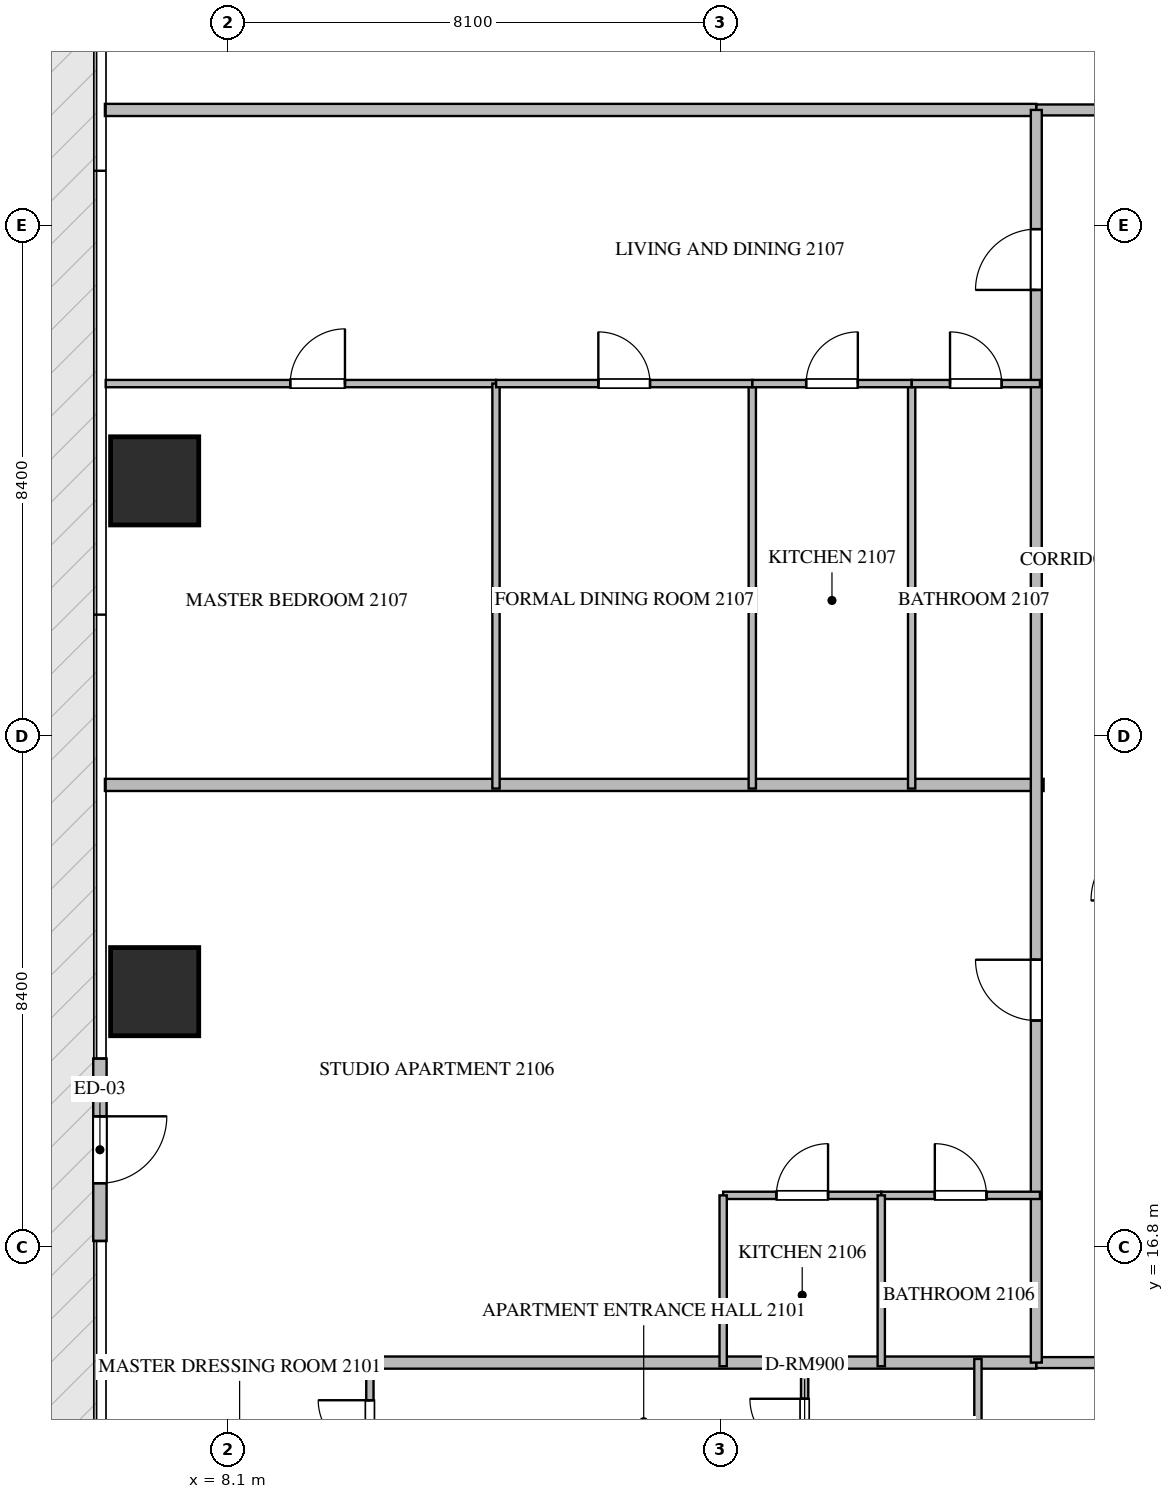
"""IFC4 building model, lengths in metres.
Left out: names, types, materials, properties, quantities, classifications, styles, units other than length and angle.
Written with IfcOpenShell. Run it as: python <this file> out.ifc"""

import sys

from ifc_helpers import new_model, si_unit, direction, frame, frame_2d, origin, origin_2d, place, context, subcontext, project, spatial, rectangle, extrude, source, transform, mapped, element, fill, save


model = new_model("IFC4")
c1 = context("Model", 3, precision=1e-05, world=origin(), true_north=direction((0.0, 1.0)))
c2 = subcontext(c1, "Body", "Model", "MODEL_VIEW")
j1 = project(units=[si_unit("LENGTHUNIT", "METRE"), si_unit("PLANEANGLEUNIT", "RADIAN")], contexts=[c1])
p1 = place(None, origin())
s1 = spatial("IfcSite", under=j1, at=p1, CompositionType="ELEMENT")
p2 = place(p1, origin())
s2 = spatial("IfcBuilding", under=s1, at=p2, CompositionType="ELEMENT")
p3 = place(p2, frame((0.0, 0.0, 86.7)))
s3 = spatial("IfcBuildingStorey", under=s2, at=p3, CompositionType="ELEMENT", Elevation=86.7)
m1 = source(origin(), c2, "Body", "SweptSolid", [
    extrude(rectangle(XDim=1.45, YDim=1.45, at=origin_2d()), origin(), (0.0, 0.0, 1.0), 3.75),
])
for number, where, z_axis, x_axis in (
    (1, (6.9, 21.0, -0.26), (0.0, 0.0, 1.0), (1.0, 0.0, 0.0)),
    (2, (6.9, 29.4, -0.26), (0.0, 0.0, 1.0), (1.0, 0.0, 0.0)),
):
    element("IfcColumn", number, at=place(p3, frame(where, z_axis=z_axis, x_axis=x_axis)), inside=s3, PredefinedType="COLUMN", context=c2, shape_type="MappedRepresentation", body=[
        mapped(m1, transform((0.0, 0.0, 0.0), scale=1.0)),
    ])
p4 = place(p3, frame((6.0, 19.9, 0.0), z_axis=(0.0, 0.0, 1.0), x_axis=(0.0, -1.0, 0.0)))
e3 = element("IfcWall", 3, at=p4, inside=s3, PredefinedType="ELEMENTEDWALL", context=c2, shape_type="SweptSolid", body=[
    extrude(rectangle(XDim=3.0, YDim=0.22, at=frame_2d((1.5, 0.0))), origin(), (0.0, 0.0, 1.0), 3.475),
])
p5 = place(p4, frame((0.95, 0.0, 0.0)))
e4 = element("IfcOpeningElement", 4, at=p5, cuts=e3, PredefinedType="OPENING", context=c2, shape_type="SweptSolid", body=[
    extrude(rectangle(XDim=1.1, YDim=2.2, at=frame_2d((0.55, 1.1))), frame((0.0, 0.12, 0.0), z_axis=(0.0, -1.0, 0.0), x_axis=(1.0, 0.0, 0.0)), (0.0, 0.0, 1.0), 0.24),
])
p6 = place(p3, frame((6.082, 24.4, 0.0), z_axis=(0.0, 0.0, 1.0), x_axis=(1.0, 0.0, 0.0)))
e5 = element("IfcWall", 5, at=p6, inside=s3, PredefinedType="PARTITIONING", context=c2, shape_type="SweptSolid", body=[
    extrude(rectangle(XDim=15.438, YDim=0.2, at=frame_2d((7.719, 0.0))), origin(), (0.0, 0.0, 1.0), 3.49),
])
for number, where, z_axis, x_axis in (
    (6, (6.082, 14.9, 0.0), (0.0, 0.0, 1.0), (1.0, 0.0, 0.0)),
    (7, (6.082, 35.5, 0.0), (0.0, 0.0, 1.0), (1.0, 0.0, 0.0)),
):
    element("IfcWall", number, at=place(p3, frame(where, z_axis=z_axis, x_axis=x_axis)), inside=s3, PredefinedType="PARTITIONING", context=c2, shape_type="SweptSolid", body=[
        extrude(rectangle(XDim=15.318, YDim=0.2, at=frame_2d((7.659, 0.0))), origin(), (0.0, 0.0, 1.0), 3.49),
    ])
p7 = place(p3, frame((21.402, 14.9, 0.0), z_axis=(0.0, 0.0, 1.0), x_axis=(1.0, 0.0, 0.0)))
e8 = element("IfcWall", 8, at=p7, inside=s3, PredefinedType="PARTITIONING", context=c2, shape_type="SweptSolid", body=[
    extrude(rectangle(XDim=21.996, YDim=0.18, at=frame_2d((10.998, 0.0))), origin(), (0.0, 0.0, 1.0), 3.49),
])
p8 = place(p7, frame((1.82, 0.0, 0.0)))
e9 = element("IfcOpeningElement", 9, at=p8, cuts=e8, PredefinedType="OPENING", context=c2, shape_type="SweptSolid", body=[
    extrude(rectangle(XDim=1.0, YDim=2.15, at=frame_2d((0.5, 1.075))), frame((0.0, 0.1, 0.0), z_axis=(0.0, -1.0, 0.0), x_axis=(1.0, 0.0, 0.0)), (0.0, 0.0, 1.0), 0.2),
])
p9 = place(p7, frame((5.144, 0.0, 0.0)))
e10 = element("IfcOpeningElement", 10, at=p9, cuts=e8, PredefinedType="OPENING", context=c2, shape_type="SweptSolid", body=[
    extrude(rectangle(XDim=1.0, YDim=2.15, at=frame_2d((0.5, 1.075))), frame((0.0, 0.1, 0.0), z_axis=(0.0, -1.0, 0.0), x_axis=(1.0, 0.0, 0.0)), (0.0, 0.0, 1.0), 0.2),
])
p10 = place(p7, frame((11.758, 0.0, 0.0)))
e11 = element("IfcOpeningElement", 11, at=p10, cuts=e8, PredefinedType="OPENING", context=c2, shape_type="SweptSolid", body=[
    extrude(rectangle(XDim=1.0, YDim=2.15, at=frame_2d((0.5, 1.075))), frame((0.0, 0.1, 0.0), z_axis=(0.0, -1.0, 0.0), x_axis=(1.0, 0.0, 0.0)), (0.0, 0.0, 1.0), 0.2),
])
p11 = place(p7, frame((18.896, 0.0, 0.0)))
e12 = element("IfcOpeningElement", 12, at=p11, cuts=e8, PredefinedType="OPENING", context=c2, shape_type="SweptSolid", body=[
    extrude(rectangle(XDim=1.0, YDim=2.15, at=frame_2d((0.5, 1.075))), frame((0.0, 0.1, 0.0), z_axis=(0.0, -1.0, 0.0), x_axis=(1.0, 0.0, 0.0)), (0.0, 0.0, 1.0), 0.2),
])
p12 = place(p3, frame((21.402, 35.5, 0.0), z_axis=(0.0, 0.0, 1.0), x_axis=(1.0, 0.0, 0.0)))
e13 = element("IfcWall", 13, at=p12, inside=s3, PredefinedType="PARTITIONING", context=c2, shape_type="SweptSolid", body=[
    extrude(rectangle(XDim=21.996, YDim=0.18, at=frame_2d((10.998, 0.0))), origin(), (0.0, 0.0, 1.0), 3.49),
])
p13 = place(p12, frame((15.222, 0.0, 0.0)))
e14 = element("IfcOpeningElement", 14, at=p13, cuts=e13, PredefinedType="OPENING", context=c2, shape_type="SweptSolid", body=[
    extrude(rectangle(XDim=1.0, YDim=2.15, at=frame_2d((0.5, 1.075))), frame((0.0, 0.1, 0.0), z_axis=(0.0, -1.0, 0.0), x_axis=(1.0, 0.0, 0.0)), (0.0, 0.0, 1.0), 0.2),
])
p14 = place(p3, frame((21.4, 14.9, 0.0), z_axis=(0.0, 0.0, 1.0), x_axis=(0.0, 1.0, 0.0)))
e15 = element("IfcWall", 15, at=p14, inside=s3, PredefinedType="PARTITIONING", context=c2, shape_type="SweptSolid", body=[
    extrude(rectangle(XDim=20.6, YDim=0.18, at=frame_2d((10.3, 0.0))), origin(), (0.0, 0.0, 1.0), 3.49),
])
p15 = place(p14, frame((5.625, 0.0, 0.0)))
e16 = element("IfcOpeningElement", 16, at=p15, cuts=e15, PredefinedType="OPENING", context=c2, shape_type="SweptSolid", body=[
    extrude(rectangle(XDim=1.0, YDim=2.15, at=frame_2d((0.5, 1.075))), frame((0.0, 0.1, 0.0), z_axis=(0.0, -1.0, 0.0), x_axis=(1.0, 0.0, 0.0)), (0.0, 0.0, 1.0), 0.2),
])
p16 = place(p14, frame((17.64, 0.0, 0.0)))
e17 = element("IfcOpeningElement", 17, at=p16, cuts=e15, PredefinedType="OPENING", context=c2, shape_type="SweptSolid", body=[
    extrude(rectangle(XDim=1.0, YDim=2.15, at=frame_2d((0.5, 1.075))), frame((0.0, 0.1, 0.0), z_axis=(0.0, -1.0, 0.0), x_axis=(1.0, 0.0, 0.0)), (0.0, 0.0, 1.0), 0.2),
])
p17 = place(p3, frame((20.44, 12.15, 0.0), z_axis=(0.0, 0.0, 1.0), x_axis=(0.0, 1.0, 0.0)))
e18 = element("IfcWall", 18, at=p17, inside=s3, PredefinedType="PARTITIONING", context=c2, shape_type="SweptSolid", body=[
    extrude(rectangle(XDim=2.81, YDim=0.12, at=frame_2d((1.405, 0.0))), origin(), (0.0, 0.0, 1.0), 3.49),
])
p18 = place(p3, frame((17.59, 12.75, 0.0), z_axis=(0.0, 0.0, 1.0), x_axis=(0.0, 1.0, 0.0)))
e19 = element("IfcWall", 19, at=p18, inside=s3, PredefinedType="PARTITIONING", context=c2, shape_type="SweptSolid", body=[
    extrude(rectangle(XDim=2.21, YDim=0.12, at=frame_2d((1.105, 0.0))), origin(), (0.0, 0.0, 1.0), 3.49),
])
p19 = place(p18, frame((0.655, 0.0, 0.0)))
e20 = element("IfcOpeningElement", 20, at=p19, cuts=e19, PredefinedType="OPENING", context=c2, shape_type="SweptSolid", body=[
    extrude(rectangle(XDim=0.9, YDim=2.1, at=frame_2d((0.45, 1.05))), frame((0.0, 0.07, 0.0), z_axis=(0.0, -1.0, 0.0), x_axis=(1.0, 0.0, 0.0)), (0.0, 0.0, 1.0), 0.14),
])
p20 = place(p3, frame((10.44, 12.752, 0.0), z_axis=(0.0, 0.0, 1.0), x_axis=(0.0, 1.0, 0.0)))
e21 = element("IfcWall", 21, at=p20, inside=s3, PredefinedType="PARTITIONING", context=c2, shape_type="SweptSolid", body=[
    extrude(rectangle(XDim=2.208, YDim=0.12, at=frame_2d((1.104, 0.0))), origin(), (0.0, 0.0, 1.0), 3.49),
])
p21 = place(p20, frame((0.679, 0.0, 0.0)))
e22 = element("IfcOpeningElement", 22, at=p21, cuts=e21, PredefinedType="OPENING", context=c2, shape_type="SweptSolid", body=[
    extrude(rectangle(XDim=0.85, YDim=2.1, at=frame_2d((0.425, 1.05))), frame((0.0, 0.07, 0.0), z_axis=(0.0, -1.0, 0.0), x_axis=(1.0, 0.0, 0.0)), (0.0, 0.0, 1.0), 0.14),
])
p22 = place(p3, frame((16.25, 17.65, 0.0), z_axis=(0.0, 0.0, 1.0), x_axis=(1.0, 0.0, 0.0)))
e23 = element("IfcWall", 23, at=p22, inside=s3, PredefinedType="PARTITIONING", context=c2, shape_type="SweptSolid", body=[
    extrude(rectangle(XDim=2.6, YDim=0.12, at=frame_2d((1.3, 0.0))), origin(), (0.0, 0.0, 1.0), 3.49),
])
p23 = place(p22, frame((0.875, 0.0, 0.0)))
e24 = element("IfcOpeningElement", 24, at=p23, cuts=e23, PredefinedType="OPENING", context=c2, shape_type="SweptSolid", body=[
    extrude(rectangle(XDim=0.85, YDim=2.1, at=frame_2d((0.425, 1.05))), frame((0.0, 0.07, 0.0), z_axis=(0.0, -1.0, 0.0), x_axis=(1.0, 0.0, 0.0)), (0.0, 0.0, 1.0), 0.14),
])
p24 = place(p3, frame((18.852, 17.65, 0.0), z_axis=(0.0, 0.0, 1.0), x_axis=(1.0, 0.0, 0.0)))
e25 = element("IfcWall", 25, at=p24, inside=s3, PredefinedType="PARTITIONING", context=c2, shape_type="SweptSolid", body=[
    extrude(rectangle(XDim=2.608, YDim=0.12, at=frame_2d((1.304, 0.0))), origin(), (0.0, 0.0, 1.0), 3.49),
])
p25 = place(p24, frame((0.879, 0.0, 0.0)))
e26 = element("IfcOpeningElement", 26, at=p25, cuts=e25, PredefinedType="OPENING", context=c2, shape_type="SweptSolid", body=[
    extrude(rectangle(XDim=0.85, YDim=2.1, at=frame_2d((0.425, 1.05))), frame((0.0, 0.07, 0.0), z_axis=(0.0, -1.0, 0.0), x_axis=(1.0, 0.0, 0.0)), (0.0, 0.0, 1.0), 0.14),
])
for number, where, z_axis, x_axis in (
    (27, (18.85, 14.84, 0.0), (0.0, 0.0, 1.0), (0.0, 1.0, 0.0)),
    (28, (16.25, 14.84, 0.0), (0.0, 0.0, 1.0), (0.0, 1.0, 0.0)),
):
    element("IfcWall", number, at=place(p3, frame(where, z_axis=z_axis, x_axis=x_axis)), inside=s3, PredefinedType="PARTITIONING", context=c2, shape_type="SweptSolid", body=[
        extrude(rectangle(XDim=2.81, YDim=0.12, at=frame_2d((1.405, 0.0))), origin(), (0.0, 0.0, 1.0), 3.49),
    ])
p26 = place(p3, frame((6.095, 31.0, 0.0), z_axis=(0.0, 0.0, 1.0), x_axis=(1.0, 0.0, 0.0)))
e29 = element("IfcWall", 29, at=p26, inside=s3, PredefinedType="PARTITIONING", context=c2, shape_type="SweptSolid", body=[
    extrude(rectangle(XDim=6.419, YDim=0.12, at=frame_2d((3.209, 0.0))), origin(), (0.0, 0.0, 1.0), 3.49),
])
p27 = place(p26, frame((3.035, 0.0, 0.0)))
e30 = element("IfcOpeningElement", 30, at=p27, cuts=e29, PredefinedType="OPENING", context=c2, shape_type="SweptSolid", body=[
    extrude(rectangle(XDim=0.9, YDim=2.1, at=frame_2d((0.45, 1.05))), frame((0.0, 0.07, 0.0), z_axis=(0.0, -1.0, 0.0), x_axis=(1.0, 0.0, 0.0)), (0.0, 0.0, 1.0), 0.14),
])
for number, where, z_axis, x_axis in (
    (31, (12.514, 24.34, 0.0), (0.0, 0.0, 1.0), (0.0, 1.0, 0.0)),
    (32, (16.729, 24.34, 0.0), (0.0, 0.0, 1.0), (0.0, 1.0, 0.0)),
    (33, (19.35, 24.34, 0.0), (0.0, 0.0, 1.0), (0.0, 1.0, 0.0)),
):
    element("IfcWall", number, at=place(p3, frame(where, z_axis=z_axis, x_axis=x_axis)), inside=s3, PredefinedType="PARTITIONING", context=c2, shape_type="SweptSolid", body=[
        extrude(rectangle(XDim=6.66, YDim=0.12, at=frame_2d((3.33, 0.0))), origin(), (0.0, 0.0, 1.0), 3.49),
    ])
p28 = place(p3, frame((12.516, 31.0, 0.0), z_axis=(0.0, 0.0, 1.0), x_axis=(1.0, 0.0, 0.0)))
e34 = element("IfcWall", 34, at=p28, inside=s3, PredefinedType="PARTITIONING", context=c2, shape_type="SweptSolid", body=[
    extrude(rectangle(XDim=4.213, YDim=0.12, at=frame_2d((2.106, 0.0))), origin(), (0.0, 0.0, 1.0), 3.49),
])
p29 = place(p28, frame((1.681, 0.0, 0.0)))
e35 = element("IfcOpeningElement", 35, at=p29, cuts=e34, PredefinedType="OPENING", context=c2, shape_type="SweptSolid", body=[
    extrude(rectangle(XDim=0.85, YDim=2.1, at=frame_2d((0.425, 1.05))), frame((0.0, 0.07, 0.0), z_axis=(0.0, -1.0, 0.0), x_axis=(1.0, 0.0, 0.0)), (0.0, 0.0, 1.0), 0.14),
])
p30 = place(p3, frame((16.731, 31.0, 0.0), z_axis=(0.0, 0.0, 1.0), x_axis=(1.0, 0.0, 0.0)))
e36 = element("IfcWall", 36, at=p30, inside=s3, PredefinedType="PARTITIONING", context=c2, shape_type="SweptSolid", body=[
    extrude(rectangle(XDim=2.619, YDim=0.12, at=frame_2d((1.31, 0.0))), origin(), (0.0, 0.0, 1.0), 3.49),
])
p31 = place(p30, frame((0.884, 0.0, 0.0)))
e37 = element("IfcOpeningElement", 37, at=p31, cuts=e36, PredefinedType="OPENING", context=c2, shape_type="SweptSolid", body=[
    extrude(rectangle(XDim=0.85, YDim=2.1, at=frame_2d((0.425, 1.05))), frame((0.0, 0.07, 0.0), z_axis=(0.0, -1.0, 0.0), x_axis=(1.0, 0.0, 0.0)), (0.0, 0.0, 1.0), 0.14),
])
p32 = place(p3, frame((19.352, 31.0, 0.0), z_axis=(0.0, 0.0, 1.0), x_axis=(1.0, 0.0, 0.0)))
e38 = element("IfcWall", 38, at=p32, inside=s3, PredefinedType="PARTITIONING", context=c2, shape_type="SweptSolid", body=[
    extrude(rectangle(XDim=2.108, YDim=0.12, at=frame_2d((1.054, 0.0))), origin(), (0.0, 0.0, 1.0), 3.49),
])
p33 = place(p32, frame((0.629, 0.0, 0.0)))
e39 = element("IfcOpeningElement", 39, at=p33, cuts=e38, PredefinedType="OPENING", context=c2, shape_type="SweptSolid", body=[
    extrude(rectangle(XDim=0.85, YDim=2.1, at=frame_2d((0.425, 1.05))), frame((0.0, 0.07, 0.0), z_axis=(0.0, -1.0, 0.0), x_axis=(1.0, 0.0, 0.0)), (0.0, 0.0, 1.0), 0.14),
])
m2 = source(origin(), c2, "Body", "SweptSolid", [
    extrude(rectangle(XDim=1.1, YDim=2.2, at=frame_2d((0.55, 1.1))), frame((0.0, 0.025, 0.0), z_axis=(0.0, -1.0, 0.0), x_axis=(1.0, 0.0, 0.0)), (0.0, 0.0, 1.0), 0.05),
])
p34 = place(p5, origin())
e40 = element("IfcDoor", 40, at=p34, inside=s3, OperationType="SINGLE_SWING_LEFT", PredefinedType="DOOR", context=c2, shape_type="MappedRepresentation", body=[
    mapped(m2, transform((0.0, 0.0, 0.0), scale=1.0)),
])
fill(e4, e40)
m3 = source(origin(), c2, "Body", "SweptSolid", [
    extrude(rectangle(XDim=1.0, YDim=2.15, at=frame_2d((0.5, 1.075))), frame((0.0, 0.025, 0.0), z_axis=(0.0, -1.0, 0.0), x_axis=(1.0, 0.0, 0.0)), (0.0, 0.0, 1.0), 0.05),
])
p35 = place(p15, origin())
e41 = element("IfcDoor", 41, at=p35, inside=s3, OperationType="SINGLE_SWING_RIGHT", PredefinedType="DOOR", context=c2, shape_type="MappedRepresentation", body=[
    mapped(m3, transform((0.0, 0.0, 0.0), scale=1.0)),
])
fill(e16, e41)
p36 = place(p16, origin())
e42 = element("IfcDoor", 42, at=p36, inside=s3, OperationType="SINGLE_SWING_LEFT", PredefinedType="DOOR", context=c2, shape_type="MappedRepresentation", body=[
    mapped(m3, transform((0.0, 0.0, 0.0), scale=1.0)),
])
fill(e17, e42)
m4 = source(origin(), c2, "Body", "SweptSolid", [
    extrude(rectangle(XDim=0.9, YDim=2.1, at=frame_2d((0.45, 1.05))), frame((0.0, 0.025, 0.0), z_axis=(0.0, -1.0, 0.0), x_axis=(1.0, 0.0, 0.0)), (0.0, 0.0, 1.0), 0.05),
])
p37 = place(p19, origin())
e43 = element("IfcDoor", 43, at=p37, inside=s3, OperationType="SINGLE_SWING_RIGHT", PredefinedType="DOOR", context=c2, shape_type="MappedRepresentation", body=[
    mapped(m4, transform((0.0, 0.0, 0.0), scale=1.0)),
])
fill(e20, e43)
m5 = source(origin(), c2, "Body", "SweptSolid", [
    extrude(rectangle(XDim=0.85, YDim=2.1, at=frame_2d((0.425, 1.05))), frame((0.0, 0.025, 0.0), z_axis=(0.0, -1.0, 0.0), x_axis=(1.0, 0.0, 0.0)), (0.0, 0.0, 1.0), 0.05),
])
p38 = place(p21, origin())
e44 = element("IfcDoor", 44, at=p38, inside=s3, OperationType="SINGLE_SWING_RIGHT", PredefinedType="DOOR", context=c2, shape_type="MappedRepresentation", body=[
    mapped(m5, transform((0.0, 0.0, 0.0), scale=1.0)),
])
fill(e22, e44)
p39 = place(p23, origin())
e45 = element("IfcDoor", 45, at=p39, inside=s3, OperationType="SINGLE_SWING_RIGHT", PredefinedType="DOOR", context=c2, shape_type="MappedRepresentation", body=[
    mapped(m5, transform((0.0, 0.0, 0.0), scale=1.0)),
])
fill(e24, e45)
p40 = place(p25, origin())
e46 = element("IfcDoor", 46, at=p40, inside=s3, OperationType="SINGLE_SWING_LEFT", PredefinedType="DOOR", context=c2, shape_type="MappedRepresentation", body=[
    mapped(m5, transform((0.0, 0.0, 0.0), scale=1.0)),
])
fill(e26, e46)
p41 = place(p27, origin())
e47 = element("IfcDoor", 47, at=p41, inside=s3, OperationType="SINGLE_SWING_RIGHT", PredefinedType="DOOR", context=c2, shape_type="MappedRepresentation", body=[
    mapped(m4, transform((0.0, 0.0, 0.0), scale=1.0)),
])
fill(e30, e47)
p42 = place(p29, origin())
e48 = element("IfcDoor", 48, at=p42, inside=s3, OperationType="SINGLE_SWING_LEFT", PredefinedType="DOOR", context=c2, shape_type="MappedRepresentation", body=[
    mapped(m5, transform((0.0, 0.0, 0.0), scale=1.0)),
])
fill(e35, e48)
p43 = place(p31, origin())
e49 = element("IfcDoor", 49, at=p43, inside=s3, OperationType="SINGLE_SWING_RIGHT", PredefinedType="DOOR", context=c2, shape_type="MappedRepresentation", body=[
    mapped(m5, transform((0.0, 0.0, 0.0), scale=1.0)),
])
fill(e37, e49)
p44 = place(p33, origin())
e50 = element("IfcDoor", 50, at=p44, inside=s3, OperationType="SINGLE_SWING_LEFT", PredefinedType="DOOR", context=c2, shape_type="MappedRepresentation", body=[
    mapped(m5, transform((0.0, 0.0, 0.0), scale=1.0)),
])
fill(e39, e50)
save(model, sys.argv[1])
